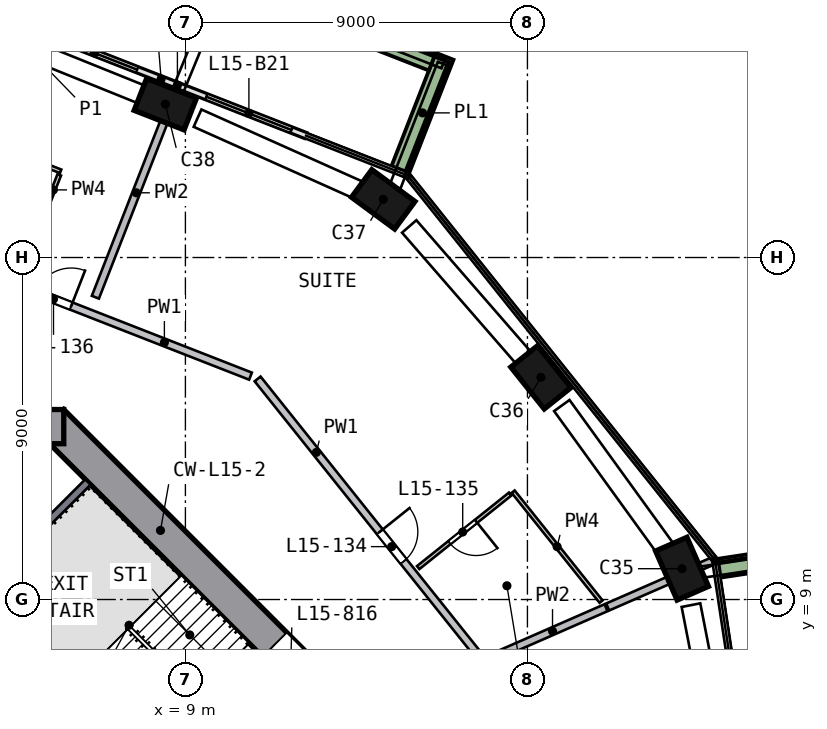
"""IFC4 building model, lengths in metres.
Left out: names, types, materials, properties, quantities, classifications, styles, units other than length and angle.
Written with IfcOpenShell. Run it as: python <this file> out.ifc"""

import sys

from ifc_helpers import new_model, si_unit, direction, frame, frame_2d, origin, origin_2d, place, context, subcontext, project, spatial, rectangle, extrude, element, fill, save


model = new_model("IFC4")
c1 = context("Model", 3, precision=1e-05, world=origin(), true_north=direction((0.0, 1.0)))
c2 = subcontext(c1, "Body", "Model", "MODEL_VIEW")
j1 = project(units=[si_unit("LENGTHUNIT", "METRE"), si_unit("PLANEANGLEUNIT", "RADIAN")], contexts=[c1])
p1 = place(None, origin())
s1 = spatial("IfcSite", under=j1, at=p1, CompositionType="ELEMENT")
p2 = place(p1, origin())
s2 = spatial("IfcBuilding", under=s1, at=p2, CompositionType="ELEMENT")
p3 = place(p2, frame((0.0, 0.0, 68.0)))
s3 = spatial("IfcBuildingStorey", under=s2, at=p3, CompositionType="ELEMENT", Elevation=68.0)
p4 = place(p3, frame((22.125, 9.684, 0.0), z_axis=(-0.046909277, 0.104842615, 0.993381873), x_axis=(0.397994334, -0.910169761, 0.114854325)))
e1 = element("IfcColumn", 1, at=p4, inside=s3, PredefinedType="COLUMN", context=c2, shape_type="SweptSolid", body=[
    extrude(rectangle(XDim=1.4, YDim=0.9, at=origin_2d()), origin(), (0.0, 0.0, 1.0), 3.211),
])
p5 = place(p3, frame((18.44, 14.742, 0.0), z_axis=(-0.070879135, 0.087077907, 0.993676802), x_axis=(-0.620727709, 0.775945613, -0.112274296)))
e2 = element("IfcColumn", 2, at=p5, inside=s3, PredefinedType="COLUMN", context=c2, shape_type="SweptSolid", body=[
    extrude(rectangle(XDim=1.4, YDim=0.9, at=origin_2d()), origin(), (0.0, 0.0, 1.0), 3.21),
])
p6 = place(p3, frame((14.318, 19.449, 0.0), z_axis=(-0.093058524, 0.067284962, 0.99338454), x_axis=(0.800033999, -0.588862787, 0.114831255)))
e3 = element("IfcColumn", 3, at=p6, inside=s3, PredefinedType="COLUMN", context=c2, shape_type="SweptSolid", body=[
    extrude(rectangle(XDim=1.4, YDim=0.9, at=origin_2d()), origin(), (0.0, 0.0, 1.0), 3.211),
])
p7 = place(p3, frame((8.599, 21.987, 0.0), z_axis=(-0.104949359, 0.040002437, 0.993672701), x_axis=(-0.925474949, 0.361776799, -0.112310579)))
e4 = element("IfcColumn", 4, at=p7, inside=s3, PredefinedType="COLUMN", context=c2, shape_type="SweptSolid", body=[
    extrude(rectangle(XDim=1.4, YDim=0.9, at=origin_2d()), origin(), (0.0, 0.0, 1.0), 3.21),
])
p8 = place(p3, frame((13.682, 5.481, 0.0), z_axis=(0.0, 0.0, 1.0), x_axis=(-0.707106781, 0.707106781, 0.0)))
e5 = element("IfcWall", 5, at=p8, inside=s3, PredefinedType="SHEAR", context=c2, shape_type="SweptSolid", body=[
    extrude(rectangle(XDim=11.598, YDim=0.9, at=frame_2d((5.799, 0.0))), origin(), (0.0, 0.0, 1.0), 3.5),
])
p9 = place(p8, frame((2.099, 0.0, 0.0)))
e6 = element("IfcOpeningElement", 6, at=p9, cuts=e5, PredefinedType="OPENING", context=c2, shape_type="SweptSolid", body=[
    extrude(rectangle(XDim=1.2, YDim=2.1, at=frame_2d((0.6, 1.05))), frame((0.0, 0.46, 0.0), z_axis=(0.0, -1.0, 0.0), x_axis=(1.0, 0.0, 0.0)), (0.0, 0.0, 1.0), 0.92),
])
p10 = place(p3, frame((5.799, 13.55, 0.0), z_axis=(0.0, 0.0, 1.0), x_axis=(-1.0, 0.0, 0.0)))
e7 = element("IfcWall", 7, at=p10, inside=s3, PredefinedType="SHEAR", context=c2, shape_type="SweptSolid", body=[
    extrude(rectangle(XDim=11.598, YDim=0.9, at=frame_2d((5.799, 0.0))), origin(), (0.0, 0.0, 1.0), 3.5),
])
p11 = place(p10, frame((4.899, 0.0, 0.0)))
e8 = element("IfcOpeningElement", 8, at=p11, cuts=e7, PredefinedType="OPENING", context=c2, shape_type="SweptSolid", body=[
    extrude(rectangle(XDim=1.8, YDim=2.1, at=frame_2d((0.9, 1.05))), frame((0.0, 0.46, 0.0), z_axis=(0.0, -1.0, 0.0), x_axis=(1.0, 0.0, 0.0)), (0.0, 0.0, 1.0), 0.92),
])
p12 = place(p3, frame((12.161, 21.211, 0.0), z_axis=(0.0, 0.0, 1.0), x_axis=(-0.931306801, 0.364235697, 0.0)))
e9 = element("IfcWall", 9, at=p12, inside=s3, PredefinedType="SOLIDWALL", context=c2, shape_type="SweptSolid", body=[
    extrude(rectangle(XDim=3.6, YDim=0.15, at=frame_2d((1.8, 0.0))), origin(), (0.0, 0.0, 1.0), 2.425),
])
p13 = place(p12, frame((0.4, 0.0, 0.0)))
e10 = element("IfcOpeningElement", 10, at=p13, cuts=e9, PredefinedType="OPENING", context=c2, shape_type="SweptSolid", body=[
    extrude(rectangle(XDim=2.4, YDim=2.4, at=frame_2d((1.2, 1.2))), frame((0.0, 0.085, 0.0), z_axis=(0.0, -1.0, 0.0), x_axis=(1.0, 0.0, 0.0)), (0.0, 0.0, 1.0), 0.17),
])
p14 = place(p3, frame((8.808, 22.522, 0.0), z_axis=(0.0, 0.0, 1.0), x_axis=(-0.931314617, 0.364215712, 0.0)))
e11 = element("IfcWall", 11, at=p14, inside=s3, PredefinedType="SOLIDWALL", context=c2, shape_type="SweptSolid", body=[
    extrude(rectangle(XDim=3.96, YDim=0.15, at=frame_2d((1.98, 0.0))), origin(), (0.0, 0.0, 1.0), 2.425),
])
p15 = place(p14, frame((1.16, 0.0, 0.0)))
e12 = element("IfcOpeningElement", 12, at=p15, cuts=e11, PredefinedType="OPENING", context=c2, shape_type="SweptSolid", body=[
    extrude(rectangle(XDim=2.4, YDim=2.4, at=frame_2d((1.2, 1.2))), frame((0.0, 0.085, 0.0), z_axis=(0.0, -1.0, 0.0), x_axis=(1.0, 0.0, 0.0)), (0.0, 0.0, 1.0), 0.17),
])
p16 = place(p3, frame((25.713, 10.229, 0.0), z_axis=(0.0, 0.0, 1.0), x_axis=(-0.988647191, -0.150255557, 0.0)))
e13 = element("IfcWall", 13, at=p16, inside=s3, PredefinedType="SOLIDWALL", context=c2, shape_type="SweptSolid", body=[
    extrude(rectangle(XDim=2.699, YDim=0.5, at=frame_2d((1.349, 0.0))), origin(), (0.0, 0.0, 1.0), 0.7),
])
p17 = place(p3, frame((14.656, 20.317, 0.0), z_axis=(0.0, 0.0, 1.0), x_axis=(0.364261223, 0.931296817, 0.0)))
e14 = element("IfcWall", 14, at=p17, inside=s3, PredefinedType="SOLIDWALL", context=c2, shape_type="SweptSolid", body=[
    extrude(rectangle(XDim=3.199, YDim=0.5, at=frame_2d((1.6, 0.0))), origin(), (0.0, 0.0, 1.0), 0.7),
])
p18 = place(p3, frame((15.498, 23.154, 0.0), z_axis=(0.0, 0.0, 1.0), x_axis=(-0.931310055, 0.364227375, 0.0)))
e15 = element("IfcWall", 15, at=p18, inside=s3, PredefinedType="SOLIDWALL", context=c2, shape_type="SweptSolid", body=[
    extrude(rectangle(XDim=10.652, YDim=0.5, at=frame_2d((5.326, 0.0))), origin(), (0.0, 0.0, 1.0), 0.7),
])
p19 = place(p3, frame((3.535, 9.334, 0.0), z_axis=(0.0, 0.0, 1.0), x_axis=(0.707106781, -0.707106781, 0.0)))
e16 = element("IfcWall", 16, at=p19, inside=s3, PredefinedType="SOLIDWALL", context=c2, shape_type="SweptSolid", body=[
    extrude(rectangle(XDim=8.2, YDim=0.2, at=frame_2d((4.1, 0.0))), origin(), (0.0, 0.0, 1.0), 3.19),
])
p20 = place(p19, frame((6.6, 0.0, 0.0)))
e17 = element("IfcOpeningElement", 17, at=p20, cuts=e16, PredefinedType="OPENING", context=c2, shape_type="SweptSolid", body=[
    extrude(rectangle(XDim=1.2, YDim=2.1, at=frame_2d((0.6, 1.05))), frame((0.0, 0.11, 0.0), z_axis=(0.0, -1.0, 0.0), x_axis=(1.0, 0.0, 0.0)), (0.0, 0.0, 1.0), 0.22),
])
p21 = place(p3, frame((3.677, 9.334, 0.0), z_axis=(0.0, 0.0, 1.0), x_axis=(0.707106781, 0.707106781, 0.0)))
e18 = element("IfcWall", 18, at=p21, inside=s3, PredefinedType="SOLIDWALL", context=c2, shape_type="SweptSolid", body=[
    extrude(rectangle(XDim=3.9, YDim=0.2, at=frame_2d((1.95, 0.0))), origin(), (0.0, 0.0, 1.0), 3.19),
])
p22 = place(p3, frame((2.037, 18.271, 0.0), z_axis=(0.0, 0.0, 1.0), x_axis=(0.931315451, -0.364213578, 0.0)))
e19 = element("IfcWall", 19, at=p22, inside=s3, PredefinedType="SOLIDWALL", context=c2, shape_type="SweptSolid", body=[
    extrude(rectangle(XDim=9.316, YDim=0.2, at=frame_2d((4.658, 0.0))), origin(), (0.0, 0.0, 1.0), 3.19),
])
p23 = place(p22, frame((3.25, 0.0, 0.0)))
e20 = element("IfcOpeningElement", 20, at=p23, cuts=e19, PredefinedType="OPENING", context=c2, shape_type="SweptSolid", body=[
    extrude(rectangle(XDim=1.0, YDim=2.1, at=frame_2d((0.5, 1.05))), frame((0.0, 0.11, 0.0), z_axis=(0.0, -1.0, 0.0), x_axis=(1.0, 0.0, 0.0)), (0.0, 0.0, 1.0), 0.22),
])
p24 = place(p3, frame((10.9, 14.805, 0.0), z_axis=(0.0, 0.0, 1.0), x_axis=(0.624423357, -0.781086085, 0.0)))
e21 = element("IfcWall", 21, at=p24, inside=s3, PredefinedType="SOLIDWALL", context=c2, shape_type="SweptSolid", body=[
    extrude(rectangle(XDim=9.316, YDim=0.2, at=frame_2d((4.658, 0.0))), origin(), (0.0, 0.0, 1.0), 3.19),
])
p25 = place(p24, frame((5.15, 0.0, 0.0)))
e22 = element("IfcOpeningElement", 22, at=p25, cuts=e21, PredefinedType="OPENING", context=c2, shape_type="SweptSolid", body=[
    extrude(rectangle(XDim=1.0, YDim=2.1, at=frame_2d((0.5, 1.05))), frame((0.0, 0.11, 0.0), z_axis=(0.0, -1.0, 0.0), x_axis=(1.0, 0.0, 0.0)), (0.0, 0.0, 1.0), 0.22),
])
p26 = place(p3, frame((6.631, 16.955, 0.0), z_axis=(0.0, 0.0, 1.0), x_axis=(0.36422, 0.93131294, 0.0)))
e23 = element("IfcWall", 23, at=p26, inside=s3, PredefinedType="SOLIDWALL", context=c2, shape_type="SweptSolid", body=[
    extrude(rectangle(XDim=5.903, YDim=0.2, at=frame_2d((2.951, 0.0))), origin(), (0.0, 0.0, 1.0), 3.19),
])
p27 = place(p3, frame((17.252, 7.552, 0.0), z_axis=(0.0, 0.0, 1.0), x_axis=(0.916111768, 0.400922971, 0.0)))
e24 = element("IfcWall", 24, at=p27, inside=s3, PredefinedType="SOLIDWALL", context=c2, shape_type="SweptSolid", body=[
    extrude(rectangle(XDim=3.074, YDim=0.2, at=frame_2d((1.537, 0.0))), origin(), (0.0, 0.0, 1.0), 3.19),
])
p28 = place(p3, frame((20.11, 8.803, 0.0), z_axis=(0.0, 0.0, 1.0), x_axis=(0.91609034, 0.400971931, 0.0)))
e25 = element("IfcWall", 25, at=p28, inside=s3, PredefinedType="SOLIDWALL", context=c2, shape_type="SweptSolid", body=[
    extrude(rectangle(XDim=3.011, YDim=0.2, at=frame_2d((1.506, 0.0))), origin(), (0.0, 0.0, 1.0), 3.19),
])
p29 = place(p3, frame((2.596, 21.489, 0.0), z_axis=(0.0, 0.0, 1.0), x_axis=(0.931289003, -0.364281199, 0.0)))
e26 = element("IfcWall", 26, at=p29, inside=s3, PredefinedType="PARTITIONING", context=c2, shape_type="SweptSolid", body=[
    extrude(rectangle(XDim=3.35, YDim=0.1, at=frame_2d((1.675, 0.0))), origin(), (0.0, 0.0, 1.0), 3.19),
])
p30 = place(p3, frame((4.624, 17.475, 0.0), z_axis=(0.0, 0.0, 1.0), x_axis=(0.364208877, 0.93131729, 0.0)))
e27 = element("IfcWall", 27, at=p30, inside=s3, PredefinedType="PARTITIONING", context=c2, shape_type="SweptSolid", body=[
    extrude(rectangle(XDim=2.9, YDim=0.1, at=frame_2d((1.45, 0.0))), origin(), (0.0, 0.0, 1.0), 3.19),
])
p31 = place(p30, frame((0.95, 0.0, 0.0)))
e28 = element("IfcOpeningElement", 28, at=p31, cuts=e27, PredefinedType="OPENING", context=c2, shape_type="SweptSolid", body=[
    extrude(rectangle(XDim=0.9, YDim=2.1, at=frame_2d((0.45, 1.05))), frame((0.0, 0.06, 0.0), z_axis=(0.0, -1.0, 0.0), x_axis=(1.0, 0.0, 0.0)), (0.0, 0.0, 1.0), 0.12),
])
p32 = place(p3, frame((17.546, 11.776, 0.0), z_axis=(0.0, 0.0, 1.0), x_axis=(-0.781076214, -0.624435703, 0.0)))
e29 = element("IfcWall", 29, at=p32, inside=s3, PredefinedType="PARTITIONING", context=c2, shape_type="SweptSolid", body=[
    extrude(rectangle(XDim=3.1, YDim=0.1, at=frame_2d((1.55, 0.0))), origin(), (0.0, 0.0, 1.0), 3.19),
])
p33 = place(p32, frame((1.15, 0.0, 0.0)))
e30 = element("IfcOpeningElement", 30, at=p33, cuts=e29, PredefinedType="OPENING", context=c2, shape_type="SweptSolid", body=[
    extrude(rectangle(XDim=0.9, YDim=2.1, at=frame_2d((0.45, 1.05))), frame((0.0, 0.06, 0.0), z_axis=(0.0, -1.0, 0.0), x_axis=(1.0, 0.0, 0.0)), (0.0, 0.0, 1.0), 0.12),
])
p34 = place(p3, frame((17.625, 11.838, 0.0), z_axis=(0.0, 0.0, 1.0), x_axis=(0.624413662, -0.781093835, 0.0)))
e31 = element("IfcWall", 31, at=p34, inside=s3, PredefinedType="PARTITIONING", context=c2, shape_type="SweptSolid", body=[
    extrude(rectangle(XDim=3.704, YDim=0.1, at=frame_2d((1.852, 0.0))), origin(), (0.0, 0.0, 1.0), 3.19),
])
p35 = place(p13, origin())
e32 = element("IfcDoor", 32, at=p35, inside=s3, OperationType="SLIDING_TO_RIGHT", PredefinedType="DOOR", context=c2, shape_type="SweptSolid", body=[
    extrude(rectangle(XDim=2.4, YDim=2.4, at=frame_2d((1.2, 1.2))), frame((0.0, 0.025, 0.0), z_axis=(0.0, -1.0, 0.0), x_axis=(1.0, 0.0, 0.0)), (0.0, 0.0, 1.0), 0.05),
])
fill(e10, e32)
p36 = place(p15, origin())
e33 = element("IfcDoor", 33, at=p36, inside=s3, OperationType="SLIDING_TO_LEFT", PredefinedType="DOOR", context=c2, shape_type="SweptSolid", body=[
    extrude(rectangle(XDim=2.4, YDim=2.4, at=frame_2d((1.2, 1.2))), frame((0.0, 0.025, 0.0), z_axis=(0.0, -1.0, 0.0), x_axis=(1.0, 0.0, 0.0)), (0.0, 0.0, 1.0), 0.05),
])
fill(e12, e33)
p37 = place(p9, origin())
e34 = element("IfcDoor", 34, at=p37, inside=s3, OperationType="SINGLE_SWING_LEFT", PredefinedType="DOOR", context=c2, shape_type="SweptSolid", body=[
    extrude(rectangle(XDim=1.2, YDim=2.1, at=frame_2d((0.6, 1.05))), frame((0.0, 0.025, 0.0), z_axis=(0.0, -1.0, 0.0), x_axis=(1.0, 0.0, 0.0)), (0.0, 0.0, 1.0), 0.05),
])
fill(e6, e34)
p38 = place(p25, origin())
e35 = element("IfcDoor", 35, at=p38, inside=s3, OperationType="SINGLE_SWING_LEFT", PredefinedType="DOOR", context=c2, shape_type="SweptSolid", body=[
    extrude(rectangle(XDim=1.0, YDim=2.1, at=frame_2d((0.5, 1.05))), frame((0.0, 0.025, 0.0), z_axis=(0.0, -1.0, 0.0), x_axis=(1.0, 0.0, 0.0)), (0.0, 0.0, 1.0), 0.05),
])
fill(e22, e35)
p39 = place(p33, origin())
e36 = element("IfcDoor", 36, at=p39, inside=s3, OperationType="SINGLE_SWING_LEFT", PredefinedType="DOOR", context=c2, shape_type="SweptSolid", body=[
    extrude(rectangle(XDim=0.9, YDim=2.1, at=frame_2d((0.45, 1.05))), frame((0.0, 0.025, 0.0), z_axis=(0.0, -1.0, 0.0), x_axis=(1.0, 0.0, 0.0)), (0.0, 0.0, 1.0), 0.05),
])
fill(e30, e36)
p40 = place(p23, origin())
e37 = element("IfcDoor", 37, at=p40, inside=s3, OperationType="SINGLE_SWING_RIGHT", PredefinedType="DOOR", context=c2, shape_type="SweptSolid", body=[
    extrude(rectangle(XDim=1.0, YDim=2.1, at=frame_2d((0.5, 1.05))), frame((0.0, 0.025, 0.0), z_axis=(0.0, -1.0, 0.0), x_axis=(1.0, 0.0, 0.0)), (0.0, 0.0, 1.0), 0.05),
])
fill(e20, e37)
save(model, sys.argv[1])
